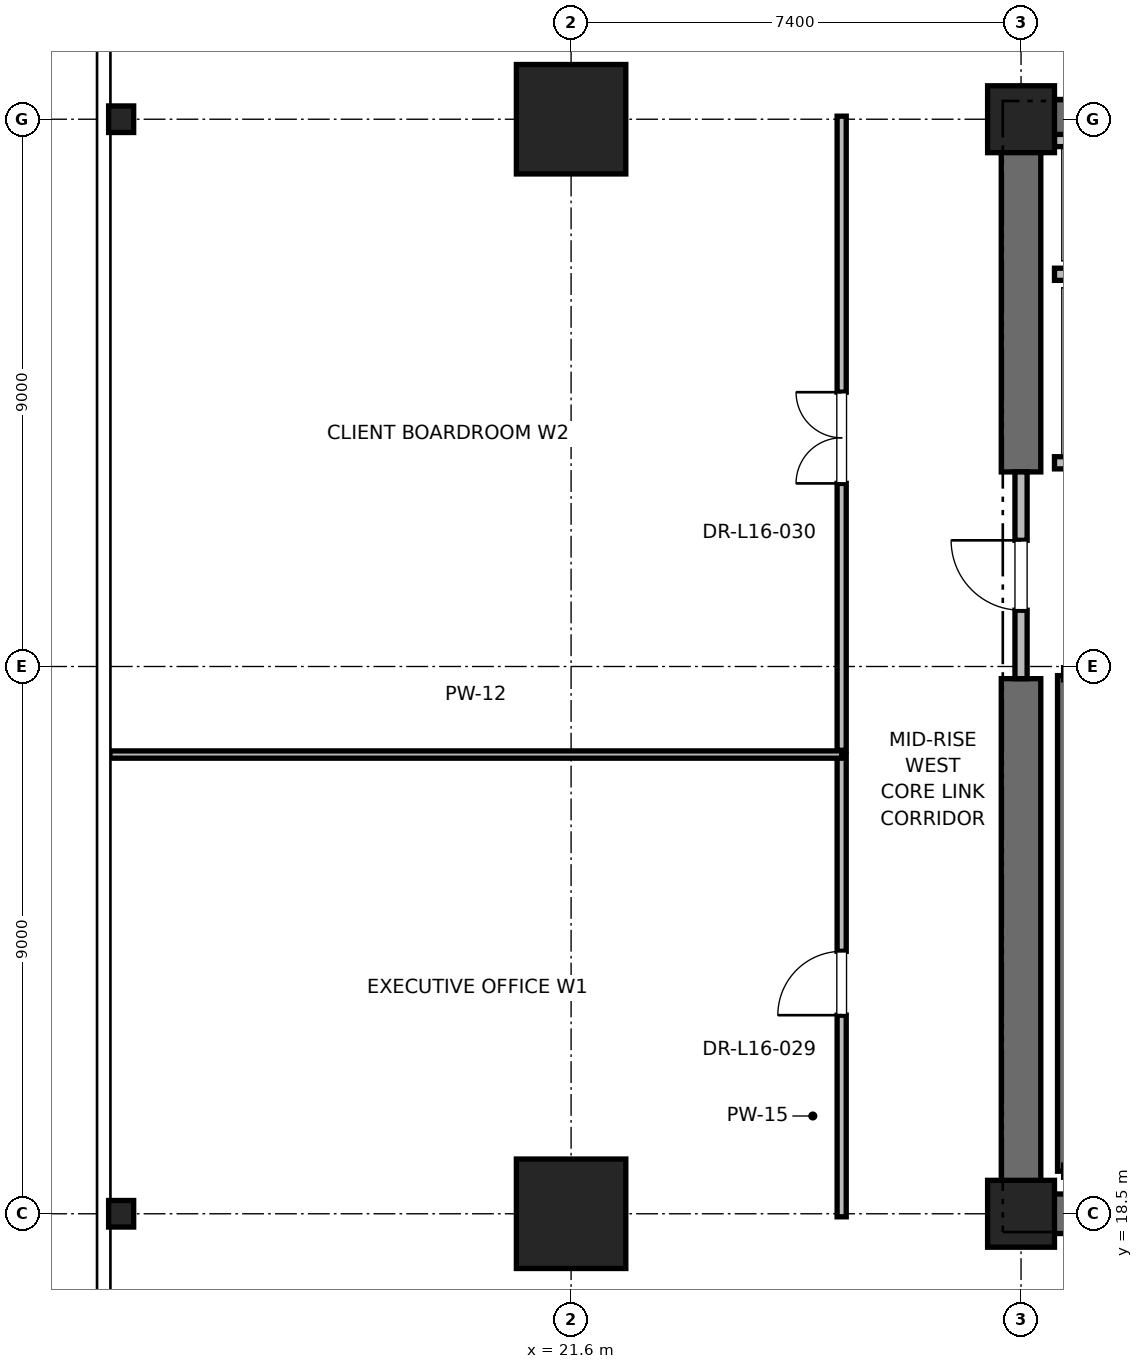
"""IFC4 building model, lengths in metres.
Left out: names, types, materials, properties, quantities, classifications, styles, units other than length and angle.
Written with IfcOpenShell. Run it as: python <this file> out.ifc"""

import sys

from ifc_helpers import new_model, si_unit, direction, frame, frame_2d, origin, origin_2d, place, context, subcontext, project, spatial, rectangle, i_section, extrude, element, fill, save


model = new_model("IFC4")
c1 = context("Model", 3, precision=1e-05, world=origin(), true_north=direction((0.0, 1.0)))
c2 = subcontext(c1, "Body", "Model", "MODEL_VIEW")
j1 = project(units=[si_unit("LENGTHUNIT", "METRE"), si_unit("PLANEANGLEUNIT", "RADIAN")], contexts=[c1])
p1 = place(None, origin())
s1 = spatial("IfcSite", under=j1, at=p1, CompositionType="ELEMENT")
p2 = place(p1, origin())
s2 = spatial("IfcBuilding", under=s1, at=p2, CompositionType="ELEMENT")
p3 = place(p2, frame((0.0, 0.0, 71.6)))
s3 = spatial("IfcBuildingStorey", under=s2, at=p3, CompositionType="ELEMENT", Elevation=71.6)
for number, where, z_axis, x_axis in (
    (1, (21.6, 18.5, 0.0), (0.0, 0.0, 1.0), (1.0, 0.0, 0.0)),
    (2, (21.6, 36.5, 0.0), (0.0, 0.0, 1.0), (1.0, 0.0, 0.0)),
):
    element("IfcColumn", number, at=place(p3, frame(where, z_axis=z_axis, x_axis=x_axis)), inside=s3, PredefinedType="COLUMN", context=c2, shape_type="SweptSolid", body=[
        extrude(rectangle(XDim=1.8, YDim=1.8, at=origin_2d()), origin(), (0.0, 0.0, 1.0), 4.0),
    ])
for number, where, z_axis, x_axis in (
    (3, (14.2, 18.5, 0.0), (0.0, 0.0, 1.0), (1.0, 0.0, 0.0)),
    (4, (14.2, 36.5, 0.0), (0.0, 0.0, 1.0), (1.0, 0.0, 0.0)),
):
    element("IfcColumn", number, at=place(p3, frame(where, z_axis=z_axis, x_axis=x_axis)), inside=s3, PredefinedType="COLUMN", context=c2, shape_type="SweptSolid", body=[
        extrude(i_section(OverallWidth=0.412, OverallDepth=0.437, WebThickness=0.036, FlangeThickness=0.058, FilletRadius=0.015, at=origin_2d()), origin(), (0.0, 0.0, 1.0), 4.0),
    ])
for number, where, z_axis, x_axis in (
    (5, (29.0, 18.5, 0.0), (0.0, 0.0, 1.0), (1.0, 0.0, 0.0)),
    (6, (29.0, 36.5, 0.0), (0.0, 0.0, 1.0), (1.0, 0.0, 0.0)),
):
    element("IfcColumn", number, at=place(p3, frame(where, z_axis=z_axis, x_axis=x_axis)), inside=s3, PredefinedType="PILASTER", context=c2, shape_type="SweptSolid", body=[
        extrude(rectangle(XDim=1.1, YDim=1.1, at=origin_2d()), origin(), (0.0, 0.0, 1.0), 4.0),
    ])
p4 = place(p3, frame((29.0, 18.5, 0.0), z_axis=(0.0, 0.0, 1.0), x_axis=(1.0, 0.0, 0.0)))
e7 = element("IfcWall", 7, at=p4, inside=s3, PredefinedType="SHEAR", context=c2, shape_type="SweptSolid", body=[
    extrude(rectangle(XDim=9.2, YDim=0.65, at=frame_2d((4.6, 0.0))), origin(), (0.0, 0.0, 1.0), 3.76),
])
p5 = place(p3, frame((29.0, 36.5, 0.0), z_axis=(0.0, 0.0, 1.0), x_axis=(1.0, 0.0, 0.0)))
e8 = element("IfcWall", 8, at=p5, inside=s3, PredefinedType="SHEAR", context=c2, shape_type="SweptSolid", body=[
    extrude(rectangle(XDim=5.8, YDim=0.65, at=frame_2d((2.9, 0.0))), origin(), (0.0, 0.0, 1.0), 3.76),
])
p6 = place(p3, frame((29.0, 18.5, 0.0), z_axis=(0.0, 0.0, 1.0), x_axis=(0.0, 1.0, 0.0)))
e9 = element("IfcWall", 9, at=p6, inside=s3, PredefinedType="SHEAR", context=c2, shape_type="SweptSolid", body=[
    extrude(rectangle(XDim=8.8, YDim=0.65, at=frame_2d((4.4, 0.0))), origin(), (0.0, 0.0, 1.0), 3.76),
])
p7 = place(p3, frame((29.0, 30.7, 0.0), z_axis=(0.0, 0.0, 1.0), x_axis=(0.0, 1.0, 0.0)))
e10 = element("IfcWall", 10, at=p7, inside=s3, PredefinedType="SHEAR", context=c2, shape_type="SweptSolid", body=[
    extrude(rectangle(XDim=5.8, YDim=0.65, at=frame_2d((2.9, 0.0))), origin(), (0.0, 0.0, 1.0), 3.76),
])
p8 = place(p3, frame((29.7, 19.2, 0.0), z_axis=(0.0, 0.0, 1.0), x_axis=(0.0, 1.0, 0.0)))
e11 = element("IfcWall", 11, at=p8, inside=s3, PredefinedType="SOLIDWALL", context=c2, shape_type="SweptSolid", body=[
    extrude(rectangle(XDim=8.15, YDim=0.2, at=frame_2d((4.075, 0.0))), origin(), (0.0, 0.0, 1.0), 3.76),
])
p9 = place(p3, frame((29.0, 27.3, 0.0), z_axis=(0.0, 0.0, 1.0), x_axis=(0.0, 1.0, 0.0)))
e12 = element("IfcWall", 12, at=p9, inside=s3, PredefinedType="PARTITIONING", context=c2, shape_type="SweptSolid", body=[
    extrude(rectangle(XDim=3.4, YDim=0.2, at=frame_2d((1.7, 0.0))), origin(), (0.0, 0.0, 1.0), 2.54),
])
p10 = place(p9, frame((1.125, 0.0, 0.0)))
e13 = element("IfcOpeningElement", 13, at=p10, cuts=e12, PredefinedType="OPENING", context=c2, shape_type="SweptSolid", body=[
    extrude(rectangle(XDim=1.15, YDim=2.2, at=frame_2d((0.575, 1.1))), frame((0.0, 0.1, 0.0), z_axis=(0.0, -1.0, 0.0), x_axis=(1.0, 0.0, 0.0)), (0.0, 0.0, 1.0), 0.2),
])
p11 = place(p3, frame((29.55, 30.85, 0.0), z_axis=(0.0, 0.0, 1.0), x_axis=(1.0, 0.0, 0.0)))
e14 = element("IfcWall", 14, at=p11, inside=s3, PredefinedType="SOLIDWALL", context=c2, shape_type="SweptSolid", body=[
    extrude(rectangle(XDim=2.6, YDim=0.2, at=frame_2d((1.3, 0.0))), origin(), (0.0, 0.0, 1.0), 2.54),
])
p12 = place(p11, frame((0.75, 0.0, 0.0)))
e15 = element("IfcOpeningElement", 15, at=p12, cuts=e14, PredefinedType="OPENING", context=c2, shape_type="SweptSolid", body=[
    extrude(rectangle(XDim=1.1, YDim=2.2, at=frame_2d((0.55, 1.1))), frame((0.0, 0.1, 0.0), z_axis=(0.0, -1.0, 0.0), x_axis=(1.0, 0.0, 0.0)), (0.0, 0.0, 1.0), 0.2),
])
p13 = place(p3, frame((29.55, 33.95, 0.0), z_axis=(0.0, 0.0, 1.0), x_axis=(1.0, 0.0, 0.0)))
e16 = element("IfcWall", 16, at=p13, inside=s3, PredefinedType="SOLIDWALL", context=c2, shape_type="SweptSolid", body=[
    extrude(rectangle(XDim=2.8, YDim=0.2, at=frame_2d((1.4, 0.0))), origin(), (0.0, 0.0, 1.0), 3.76),
])
p14 = place(p3, frame((32.35, 36.15, 0.0), z_axis=(0.0, 0.0, 1.0), x_axis=(-1.0, 0.0, 0.0)))
e17 = element("IfcWall", 17, at=p14, inside=s3, PredefinedType="SOLIDWALL", context=c2, shape_type="SweptSolid", body=[
    extrude(rectangle(XDim=2.8, YDim=0.2, at=frame_2d((1.4, 0.0))), origin(), (0.0, 0.0, 1.0), 2.889),
])
p15 = place(p3, frame((26.05, 18.45, 0.0), z_axis=(0.0, 0.0, 1.0), x_axis=(0.0, 1.0, 0.0)))
e18 = element("IfcWall", 18, at=p15, inside=s3, PredefinedType="PARTITIONING", context=c2, shape_type="SweptSolid", body=[
    extrude(rectangle(XDim=7.602, YDim=0.15, at=frame_2d((3.801, 0.0))), origin(), (0.0, 0.0, 1.0), 2.85),
])
p16 = place(p15, frame((3.316, 0.0, 0.0)))
e19 = element("IfcOpeningElement", 19, at=p16, cuts=e18, PredefinedType="OPENING", context=c2, shape_type="SweptSolid", body=[
    extrude(rectangle(XDim=1.05, YDim=2.2, at=frame_2d((0.525, 1.1))), frame((0.0, 0.075, 0.0), z_axis=(0.0, -1.0, 0.0), x_axis=(1.0, 0.0, 0.0)), (0.0, 0.0, 1.0), 0.15),
])
p17 = place(p3, frame((14.014, 26.052, 0.0), z_axis=(0.0, 0.0, 1.0), x_axis=(1.0, 0.0, 0.0)))
e20 = element("IfcWall", 20, at=p17, inside=s3, PredefinedType="PARTITIONING", context=c2, shape_type="SweptSolid", body=[
    extrude(rectangle(XDim=12.036, YDim=0.12, at=frame_2d((6.018, 0.0))), origin(), (0.0, 0.0, 1.0), 2.85),
])
p18 = place(p3, frame((26.05, 26.122, 0.0), z_axis=(0.0, 0.0, 1.0), x_axis=(0.0, 1.0, 0.0)))
e21 = element("IfcWall", 21, at=p18, inside=s3, PredefinedType="PARTITIONING", context=c2, shape_type="SweptSolid", body=[
    extrude(rectangle(XDim=10.428, YDim=0.15, at=frame_2d((5.214, 0.0))), origin(), (0.0, 0.0, 1.0), 2.85),
])
p19 = place(p18, frame((4.389, 0.0, 0.0)))
e22 = element("IfcOpeningElement", 22, at=p19, cuts=e21, PredefinedType="OPENING", context=c2, shape_type="SweptSolid", body=[
    extrude(rectangle(XDim=1.5, YDim=2.25, at=frame_2d((0.75, 1.125))), frame((0.0, 0.075, 0.0), z_axis=(0.0, -1.0, 0.0), x_axis=(1.0, 0.0, 0.0)), (0.0, 0.0, 1.0), 0.15),
])
p20 = place(p10, origin())
e23 = element("IfcDoor", 23, at=p20, inside=s3, OperationType="SINGLE_SWING_RIGHT", PredefinedType="DOOR", context=c2, shape_type="SweptSolid", body=[
    extrude(rectangle(XDim=1.15, YDim=2.2, at=frame_2d((0.575, 1.1))), frame((0.0, 0.025, 0.0), z_axis=(0.0, -1.0, 0.0), x_axis=(1.0, 0.0, 0.0)), (0.0, 0.0, 1.0), 0.05),
])
fill(e13, e23)
p21 = place(p16, origin())
e24 = element("IfcDoor", 24, at=p21, inside=s3, OperationType="SINGLE_SWING_LEFT", PredefinedType="DOOR", context=c2, shape_type="SweptSolid", body=[
    extrude(rectangle(XDim=1.05, YDim=2.2, at=frame_2d((0.525, 1.1))), frame((0.0, 0.025, 0.0), z_axis=(0.0, -1.0, 0.0), x_axis=(1.0, 0.0, 0.0)), (0.0, 0.0, 1.0), 0.05),
])
fill(e19, e24)
p22 = place(p19, origin())
e25 = element("IfcDoor", 25, at=p22, inside=s3, OperationType="DOUBLE_DOOR_SINGLE_SWING", PredefinedType="DOOR", context=c2, shape_type="SweptSolid", body=[
    extrude(rectangle(XDim=1.5, YDim=2.25, at=frame_2d((0.75, 1.125))), frame((0.0, 0.025, 0.0), z_axis=(0.0, -1.0, 0.0), x_axis=(1.0, 0.0, 0.0)), (0.0, 0.0, 1.0), 0.05),
])
fill(e22, e25)
save(model, sys.argv[1])
